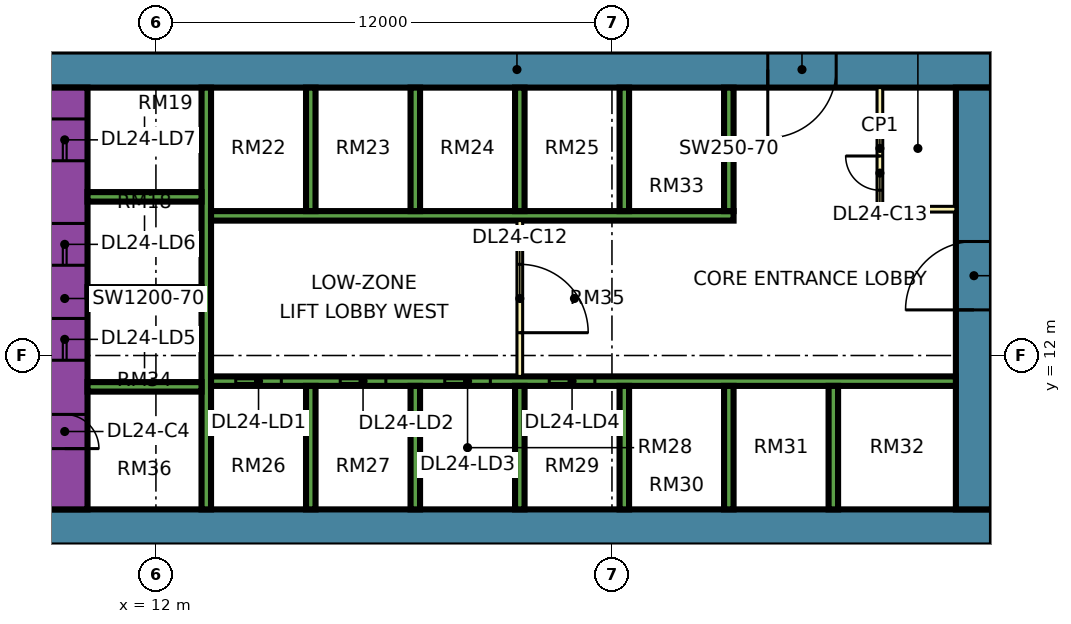
"""IFC4 building model, lengths in metres.
Left out: names, types, materials, properties, quantities, classifications, styles, units other than length and angle.
Written with IfcOpenShell. Run it as: python <this file> out.ifc"""

import sys

from ifc_helpers import new_model, si_unit, direction, frame, frame_2d, origin, place, context, subcontext, project, spatial, rectangle, extrude, element, fill, save


model = new_model("IFC4")
c1 = context("Model", 3, precision=1e-05, world=origin(), true_north=direction((0.0, 1.0)))
c2 = subcontext(c1, "Body", "Model", "MODEL_VIEW")
j1 = project(units=[si_unit("LENGTHUNIT", "METRE"), si_unit("PLANEANGLEUNIT", "RADIAN")], contexts=[c1])
p1 = place(None, origin())
s1 = spatial("IfcSite", under=j1, at=p1, CompositionType="ELEMENT")
p2 = place(p1, origin())
s2 = spatial("IfcBuilding", under=s1, at=p2, CompositionType="ELEMENT")
p3 = place(p2, frame((0.0, 0.0, 106.9)))
s3 = spatial("IfcBuildingStorey", under=s2, at=p3, CompositionType="ELEMENT", Elevation=106.9)
p4 = place(p3, frame((9.0, 7.475, 0.0), z_axis=(0.0, 0.0, 1.0), x_axis=(1.0, 0.0, 0.0)))
e1 = element("IfcWall", 1, at=p4, inside=s3, PredefinedType="SHEAR", context=c2, shape_type="SweptSolid", body=[
    extrude(rectangle(XDim=25.0, YDim=0.95, at=frame_2d((12.5, 0.0))), origin(), (0.0, 0.0, 1.0), 3.75),
])
p5 = place(p3, frame((9.0, 19.525, 0.0), z_axis=(0.0, 0.0, 1.0), x_axis=(1.0, 0.0, 0.0)))
e2 = element("IfcWall", 2, at=p5, inside=s3, PredefinedType="SHEAR", context=c2, shape_type="SweptSolid", body=[
    extrude(rectangle(XDim=25.0, YDim=0.95, at=frame_2d((12.5, 0.0))), origin(), (0.0, 0.0, 1.0), 3.75),
])
p6 = place(p5, frame((19.1, 0.0, 0.0)))
e3 = element("IfcOpeningElement", 3, at=p6, cuts=e2, PredefinedType="OPENING", context=c2, shape_type="SweptSolid", body=[
    extrude(rectangle(XDim=1.8, YDim=2.4, at=frame_2d((0.9, 1.2))), frame((0.0, 0.485, 0.0), z_axis=(0.0, -1.0, 0.0), x_axis=(1.0, 0.0, 0.0)), (0.0, 0.0, 1.0), 0.97),
])
p7 = place(p3, frame((9.6, 7.95, 0.0), z_axis=(0.0, 0.0, 1.0), x_axis=(0.0, 1.0, 0.0)))
e4 = element("IfcWall", 4, at=p7, inside=s3, PredefinedType="SHEAR", context=c2, shape_type="SweptSolid", body=[
    extrude(rectangle(XDim=11.1, YDim=1.2, at=frame_2d((5.55, 0.0))), origin(), (0.0, 0.0, 1.0), 3.75),
])
p8 = place(p7, frame((3.925, 0.0, 0.0)))
e5 = element("IfcOpeningElement", 5, at=p8, cuts=e4, PredefinedType="OPENING", context=c2, shape_type="SweptSolid", body=[
    extrude(rectangle(XDim=1.1, YDim=2.2, at=frame_2d((0.55, 1.1))), frame((0.0, 0.61, 0.0), z_axis=(0.0, -1.0, 0.0), x_axis=(1.0, 0.0, 0.0)), (0.0, 0.0, 1.0), 1.22),
])
p9 = place(p7, frame((6.425, 0.0, 0.0)))
e6 = element("IfcOpeningElement", 6, at=p9, cuts=e4, PredefinedType="OPENING", context=c2, shape_type="SweptSolid", body=[
    extrude(rectangle(XDim=1.1, YDim=2.2, at=frame_2d((0.55, 1.1))), frame((0.0, 0.61, 0.0), z_axis=(0.0, -1.0, 0.0), x_axis=(1.0, 0.0, 0.0)), (0.0, 0.0, 1.0), 1.22),
])
p10 = place(p7, frame((9.175, 0.0, 0.0)))
e7 = element("IfcOpeningElement", 7, at=p10, cuts=e4, PredefinedType="OPENING", context=c2, shape_type="SweptSolid", body=[
    extrude(rectangle(XDim=1.1, YDim=2.2, at=frame_2d((0.55, 1.1))), frame((0.0, 0.61, 0.0), z_axis=(0.0, -1.0, 0.0), x_axis=(1.0, 0.0, 0.0)), (0.0, 0.0, 1.0), 1.22),
])
p11 = place(p7, frame((1.6, 0.0, 0.0)))
e8 = element("IfcOpeningElement", 8, at=p11, cuts=e4, PredefinedType="OPENING", context=c2, shape_type="SweptSolid", body=[
    extrude(rectangle(XDim=0.9, YDim=2.1, at=frame_2d((0.45, 1.05))), frame((0.0, 0.61, 0.0), z_axis=(0.0, -1.0, 0.0), x_axis=(1.0, 0.0, 0.0)), (0.0, 0.0, 1.0), 1.22),
])
p12 = place(p3, frame((33.525, 7.95, 0.0), z_axis=(0.0, 0.0, 1.0), x_axis=(0.0, 1.0, 0.0)))
e9 = element("IfcWall", 9, at=p12, inside=s3, PredefinedType="SHEAR", context=c2, shape_type="SweptSolid", body=[
    extrude(rectangle(XDim=11.1, YDim=0.95, at=frame_2d((5.55, 0.0))), origin(), (0.0, 0.0, 1.0), 3.75),
])
p13 = place(p12, frame((5.25, 0.0, 0.0)))
e10 = element("IfcOpeningElement", 10, at=p13, cuts=e9, PredefinedType="OPENING", context=c2, shape_type="SweptSolid", body=[
    extrude(rectangle(XDim=1.8, YDim=2.4, at=frame_2d((0.9, 1.2))), frame((0.0, 0.485, 0.0), z_axis=(0.0, -1.0, 0.0), x_axis=(1.0, 0.0, 0.0)), (0.0, 0.0, 1.0), 0.97),
])
p14 = place(p3, frame((13.325, 7.95, 0.0), z_axis=(0.0, 0.0, 1.0), x_axis=(0.0, 1.0, 0.0)))
e11 = element("IfcWall", 11, at=p14, inside=s3, PredefinedType="SHEAR", context=c2, shape_type="SweptSolid", body=[
    extrude(rectangle(XDim=11.1, YDim=0.25, at=frame_2d((5.55, 0.0))), origin(), (0.0, 0.0, 1.0), 3.75),
])
p15 = place(p3, frame((13.45, 11.325, 0.0), z_axis=(0.0, 0.0, 1.0), x_axis=(1.0, 0.0, 0.0)))
e12 = element("IfcWall", 12, at=p15, inside=s3, PredefinedType="SHEAR", context=c2, shape_type="SweptSolid", body=[
    extrude(rectangle(XDim=19.6, YDim=0.25, at=frame_2d((9.8, 0.0))), origin(), (0.0, 0.0, 1.0), 3.75),
])
p16 = place(p15, frame((0.65, 0.0, 0.0)))
e13 = element("IfcOpeningElement", 13, at=p16, cuts=e12, PredefinedType="OPENING", context=c2, shape_type="SweptSolid", body=[
    extrude(rectangle(XDim=1.2, YDim=2.2, at=frame_2d((0.6, 1.1))), frame((0.0, 0.135, 0.0), z_axis=(0.0, -1.0, 0.0), x_axis=(1.0, 0.0, 0.0)), (0.0, 0.0, 1.0), 0.27),
])
p17 = place(p15, frame((3.4, 0.0, 0.0)))
e14 = element("IfcOpeningElement", 14, at=p17, cuts=e12, PredefinedType="OPENING", context=c2, shape_type="SweptSolid", body=[
    extrude(rectangle(XDim=1.2, YDim=2.2, at=frame_2d((0.6, 1.1))), frame((0.0, 0.135, 0.0), z_axis=(0.0, -1.0, 0.0), x_axis=(1.0, 0.0, 0.0)), (0.0, 0.0, 1.0), 0.27),
])
p18 = place(p15, frame((6.15, 0.0, 0.0)))
e15 = element("IfcOpeningElement", 15, at=p18, cuts=e12, PredefinedType="OPENING", context=c2, shape_type="SweptSolid", body=[
    extrude(rectangle(XDim=1.2, YDim=2.2, at=frame_2d((0.6, 1.1))), frame((0.0, 0.135, 0.0), z_axis=(0.0, -1.0, 0.0), x_axis=(1.0, 0.0, 0.0)), (0.0, 0.0, 1.0), 0.27),
])
p19 = place(p15, frame((8.9, 0.0, 0.0)))
e16 = element("IfcOpeningElement", 16, at=p19, cuts=e12, PredefinedType="OPENING", context=c2, shape_type="SweptSolid", body=[
    extrude(rectangle(XDim=1.2, YDim=2.2, at=frame_2d((0.6, 1.1))), frame((0.0, 0.135, 0.0), z_axis=(0.0, -1.0, 0.0), x_axis=(1.0, 0.0, 0.0)), (0.0, 0.0, 1.0), 0.27),
])
p20 = place(p3, frame((13.45, 15.675, 0.0), z_axis=(0.0, 0.0, 1.0), x_axis=(1.0, 0.0, 0.0)))
e17 = element("IfcWall", 17, at=p20, inside=s3, PredefinedType="SHEAR", context=c2, shape_type="SweptSolid", body=[
    extrude(rectangle(XDim=13.75, YDim=0.25, at=frame_2d((6.875, 0.0))), origin(), (0.0, 0.0, 1.0), 3.75),
])
for number, where, z_axis, x_axis in (
    (18, (10.2, 11.175, 0.0), (0.0, 0.0, 1.0), (1.0, 0.0, 0.0)),
    (19, (10.2, 13.675, 0.0), (0.0, 0.0, 1.0), (1.0, 0.0, 0.0)),
    (20, (10.2, 16.175, 0.0), (0.0, 0.0, 1.0), (1.0, 0.0, 0.0)),
):
    element("IfcWall", number, at=place(p3, frame(where, z_axis=z_axis, x_axis=x_axis)), inside=s3, PredefinedType="SHEAR", context=c2, shape_type="SweptSolid", body=[
        extrude(rectangle(XDim=3.0, YDim=0.25, at=frame_2d((1.5, 0.0))), origin(), (0.0, 0.0, 1.0), 3.75),
    ])
for number, where, z_axis, x_axis in (
    (21, (16.075, 7.95, 0.0), (0.0, 0.0, 1.0), (0.0, 1.0, 0.0)),
    (22, (18.825, 7.95, 0.0), (0.0, 0.0, 1.0), (0.0, 1.0, 0.0)),
    (23, (21.575, 7.95, 0.0), (0.0, 0.0, 1.0), (0.0, 1.0, 0.0)),
    (24, (24.325, 7.95, 0.0), (0.0, 0.0, 1.0), (0.0, 1.0, 0.0)),
    (25, (27.075, 7.95, 0.0), (0.0, 0.0, 1.0), (0.0, 1.0, 0.0)),
    (26, (29.825, 7.95, 0.0), (0.0, 0.0, 1.0), (0.0, 1.0, 0.0)),
    (27, (16.075, 15.8, 0.0), (0.0, 0.0, 1.0), (0.0, 1.0, 0.0)),
    (28, (18.825, 15.8, 0.0), (0.0, 0.0, 1.0), (0.0, 1.0, 0.0)),
    (29, (21.575, 15.8, 0.0), (0.0, 0.0, 1.0), (0.0, 1.0, 0.0)),
    (30, (24.325, 15.8, 0.0), (0.0, 0.0, 1.0), (0.0, 1.0, 0.0)),
    (31, (27.075, 15.8, 0.0), (0.0, 0.0, 1.0), (0.0, 1.0, 0.0)),
):
    element("IfcWall", number, at=place(p3, frame(where, z_axis=z_axis, x_axis=x_axis)), inside=s3, PredefinedType="SHEAR", context=c2, shape_type="SweptSolid", body=[
        extrude(rectangle(XDim=3.25, YDim=0.25, at=frame_2d((1.625, 0.0))), origin(), (0.0, 0.0, 1.0), 3.75),
    ])
p21 = place(p3, frame((-1.447, 12.553, 0.0), z_axis=(0.0, 0.0, 1.0), x_axis=(0.707106781187, -0.707106781187, 0.0)))
e32 = element("IfcWall", 32, at=p21, inside=s3, PredefinedType="SOLIDWALL", context=c2, shape_type="SweptSolid", body=[
    extrude(rectangle(XDim=19.799, YDim=0.15, at=frame_2d((9.899, 0.0))), origin(), (0.0, 0.0, 1.0), 3.35),
])
p22 = place(p21, frame((2.212, 0.0, 0.45)))
e33 = element("IfcOpeningElement", 33, at=p22, cuts=e32, PredefinedType="OPENING", context=c2, shape_type="SweptSolid", body=[
    extrude(rectangle(XDim=3.0, YDim=2.4, at=frame_2d((1.5, 1.2))), frame((0.0, 0.085, 0.0), z_axis=(0.0, -1.0, 0.0), x_axis=(1.0, 0.0, 0.0)), (0.0, 0.0, 1.0), 0.17),
])
p23 = place(p21, frame((10.216, 0.0, 0.45)))
e34 = element("IfcOpeningElement", 34, at=p23, cuts=e32, PredefinedType="OPENING", context=c2, shape_type="SweptSolid", body=[
    extrude(rectangle(XDim=3.0, YDim=2.4, at=frame_2d((1.5, 1.2))), frame((0.0, 0.085, 0.0), z_axis=(0.0, -1.0, 0.0), x_axis=(1.0, 0.0, 0.0)), (0.0, 0.0, 1.0), 0.17),
])
p24 = place(p3, frame((21.575, 11.45, 0.0), z_axis=(0.0, 0.0, 1.0), x_axis=(0.0, 1.0, 0.0)))
e35 = element("IfcWall", 35, at=p24, inside=s3, PredefinedType="PARTITIONING", context=c2, shape_type="SweptSolid", body=[
    extrude(rectangle(XDim=4.1, YDim=0.15, at=frame_2d((2.05, 0.0))), origin(), (0.0, 0.0, 1.0), 3.35),
])
p25 = place(p24, frame((1.15, 0.0, 0.0)))
e36 = element("IfcOpeningElement", 36, at=p25, cuts=e35, PredefinedType="OPENING", context=c2, shape_type="SweptSolid", body=[
    extrude(rectangle(XDim=1.8, YDim=2.4, at=frame_2d((0.9, 1.2))), frame((0.0, 0.085, 0.0), z_axis=(0.0, -1.0, 0.0), x_axis=(1.0, 0.0, 0.0)), (0.0, 0.0, 1.0), 0.17),
])
p26 = place(p3, frame((31.05, 15.85, 0.0), z_axis=(0.0, 0.0, 1.0), x_axis=(0.0, 1.0, 0.0)))
e37 = element("IfcWall", 37, at=p26, inside=s3, PredefinedType="PARTITIONING", context=c2, shape_type="SweptSolid", body=[
    extrude(rectangle(XDim=3.2, YDim=0.15, at=frame_2d((1.6, 0.0))), origin(), (0.0, 0.0, 1.0), 3.35),
])
p27 = place(p26, frame((0.5, 0.0, 0.0)))
e38 = element("IfcOpeningElement", 38, at=p27, cuts=e37, PredefinedType="OPENING", context=c2, shape_type="SweptSolid", body=[
    extrude(rectangle(XDim=0.9, YDim=2.1, at=frame_2d((0.45, 1.05))), frame((0.0, 0.085, 0.0), z_axis=(0.0, -1.0, 0.0), x_axis=(1.0, 0.0, 0.0)), (0.0, 0.0, 1.0), 0.17),
])
p28 = place(p3, frame((31.05, 15.85, 0.0), z_axis=(0.0, 0.0, 1.0), x_axis=(1.0, 0.0, 0.0)))
e39 = element("IfcWall", 39, at=p28, inside=s3, PredefinedType="PARTITIONING", context=c2, shape_type="SweptSolid", body=[
    extrude(rectangle(XDim=2.0, YDim=0.15, at=frame_2d((1.0, 0.0))), origin(), (0.0, 0.0, 1.0), 3.35),
])
p29 = place(p16, origin())
e40 = element("IfcDoor", 40, at=p29, inside=s3, OperationType="DOUBLE_DOOR_SLIDING", PredefinedType="DOOR", context=c2, shape_type="SweptSolid", body=[
    extrude(rectangle(XDim=1.2, YDim=2.2, at=frame_2d((0.6, 1.1))), frame((0.0, 0.025, 0.0), z_axis=(0.0, -1.0, 0.0), x_axis=(1.0, 0.0, 0.0)), (0.0, 0.0, 1.0), 0.05),
])
fill(e13, e40)
p30 = place(p17, origin())
e41 = element("IfcDoor", 41, at=p30, inside=s3, OperationType="DOUBLE_DOOR_SLIDING", PredefinedType="DOOR", context=c2, shape_type="SweptSolid", body=[
    extrude(rectangle(XDim=1.2, YDim=2.2, at=frame_2d((0.6, 1.1))), frame((0.0, 0.025, 0.0), z_axis=(0.0, -1.0, 0.0), x_axis=(1.0, 0.0, 0.0)), (0.0, 0.0, 1.0), 0.05),
])
fill(e14, e41)
p31 = place(p18, origin())
e42 = element("IfcDoor", 42, at=p31, inside=s3, OperationType="DOUBLE_DOOR_SLIDING", PredefinedType="DOOR", context=c2, shape_type="SweptSolid", body=[
    extrude(rectangle(XDim=1.2, YDim=2.2, at=frame_2d((0.6, 1.1))), frame((0.0, 0.025, 0.0), z_axis=(0.0, -1.0, 0.0), x_axis=(1.0, 0.0, 0.0)), (0.0, 0.0, 1.0), 0.05),
])
fill(e15, e42)
p32 = place(p19, origin())
e43 = element("IfcDoor", 43, at=p32, inside=s3, OperationType="DOUBLE_DOOR_SLIDING", PredefinedType="DOOR", context=c2, shape_type="SweptSolid", body=[
    extrude(rectangle(XDim=1.2, YDim=2.2, at=frame_2d((0.6, 1.1))), frame((0.0, 0.025, 0.0), z_axis=(0.0, -1.0, 0.0), x_axis=(1.0, 0.0, 0.0)), (0.0, 0.0, 1.0), 0.05),
])
fill(e16, e43)
p33 = place(p8, origin())
e44 = element("IfcDoor", 44, at=p33, inside=s3, OperationType="DOUBLE_DOOR_SLIDING", PredefinedType="DOOR", context=c2, shape_type="SweptSolid", body=[
    extrude(rectangle(XDim=1.1, YDim=2.2, at=frame_2d((0.55, 1.1))), frame((0.0, 0.025, 0.0), z_axis=(0.0, -1.0, 0.0), x_axis=(1.0, 0.0, 0.0)), (0.0, 0.0, 1.0), 0.05),
])
fill(e5, e44)
p34 = place(p9, origin())
e45 = element("IfcDoor", 45, at=p34, inside=s3, OperationType="DOUBLE_DOOR_SLIDING", PredefinedType="DOOR", context=c2, shape_type="SweptSolid", body=[
    extrude(rectangle(XDim=1.1, YDim=2.2, at=frame_2d((0.55, 1.1))), frame((0.0, 0.025, 0.0), z_axis=(0.0, -1.0, 0.0), x_axis=(1.0, 0.0, 0.0)), (0.0, 0.0, 1.0), 0.05),
])
fill(e6, e45)
p35 = place(p10, origin())
e46 = element("IfcDoor", 46, at=p35, inside=s3, OperationType="DOUBLE_DOOR_SLIDING", PredefinedType="DOOR", context=c2, shape_type="SweptSolid", body=[
    extrude(rectangle(XDim=1.1, YDim=2.2, at=frame_2d((0.55, 1.1))), frame((0.0, 0.025, 0.0), z_axis=(0.0, -1.0, 0.0), x_axis=(1.0, 0.0, 0.0)), (0.0, 0.0, 1.0), 0.05),
])
fill(e7, e46)
p36 = place(p13, origin())
e47 = element("IfcDoor", 47, at=p36, inside=s3, OperationType="DOUBLE_DOOR_SINGLE_SWING", PredefinedType="DOOR", context=c2, shape_type="SweptSolid", body=[
    extrude(rectangle(XDim=1.8, YDim=2.4, at=frame_2d((0.9, 1.2))), frame((0.0, 0.025, 0.0), z_axis=(0.0, -1.0, 0.0), x_axis=(1.0, 0.0, 0.0)), (0.0, 0.0, 1.0), 0.05),
])
fill(e10, e47)
p37 = place(p6, frame((1.8, 0.0, 0.0), z_axis=(0.0, 0.0, 1.0), x_axis=(-1.0, 0.0, 0.0)))
e48 = element("IfcDoor", 48, at=p37, inside=s3, OperationType="DOUBLE_DOOR_SINGLE_SWING", PredefinedType="DOOR", context=c2, shape_type="SweptSolid", body=[
    extrude(rectangle(XDim=1.8, YDim=2.4, at=frame_2d((0.9, 1.2))), frame((0.0, 0.025, 0.0), z_axis=(0.0, -1.0, 0.0), x_axis=(1.0, 0.0, 0.0)), (0.0, 0.0, 1.0), 0.05),
])
fill(e3, e48)
p38 = place(p11, frame((0.9, 0.0, 0.0), z_axis=(0.0, 0.0, 1.0), x_axis=(-1.0, 0.0, 0.0)))
e49 = element("IfcDoor", 49, at=p38, inside=s3, OperationType="SINGLE_SWING_LEFT", PredefinedType="DOOR", context=c2, shape_type="SweptSolid", body=[
    extrude(rectangle(XDim=0.9, YDim=2.1, at=frame_2d((0.45, 1.05))), frame((0.0, 0.025, 0.0), z_axis=(0.0, -1.0, 0.0), x_axis=(1.0, 0.0, 0.0)), (0.0, 0.0, 1.0), 0.05),
])
fill(e8, e49)
p39 = place(p25, frame((1.8, 0.0, 0.0), z_axis=(0.0, 0.0, 1.0), x_axis=(-1.0, 0.0, 0.0)))
e50 = element("IfcDoor", 50, at=p39, inside=s3, OperationType="DOUBLE_DOOR_SINGLE_SWING", PredefinedType="DOOR", context=c2, shape_type="SweptSolid", body=[
    extrude(rectangle(XDim=1.8, YDim=2.4, at=frame_2d((0.9, 1.2))), frame((0.0, 0.025, 0.0), z_axis=(0.0, -1.0, 0.0), x_axis=(1.0, 0.0, 0.0)), (0.0, 0.0, 1.0), 0.05),
])
fill(e36, e50)
p40 = place(p27, frame((0.9, 0.0, 0.0), z_axis=(0.0, 0.0, 1.0), x_axis=(-1.0, 0.0, 0.0)))
e51 = element("IfcDoor", 51, at=p40, inside=s3, OperationType="SINGLE_SWING_RIGHT", PredefinedType="DOOR", context=c2, shape_type="SweptSolid", body=[
    extrude(rectangle(XDim=0.9, YDim=2.1, at=frame_2d((0.45, 1.05))), frame((0.0, 0.025, 0.0), z_axis=(0.0, -1.0, 0.0), x_axis=(1.0, 0.0, 0.0)), (0.0, 0.0, 1.0), 0.05),
])
fill(e38, e51)
save(model, sys.argv[1])
